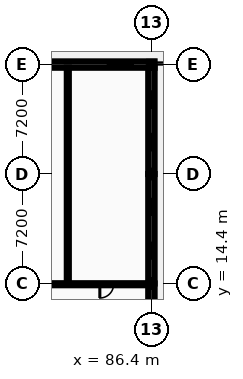
"""IFC4 building model, lengths in metres.
Left out: names, types, materials, properties, quantities, classifications, styles, units other than length and angle.
Written with IfcOpenShell. Run it as: python <this file> out.ifc"""

import sys

from ifc_helpers import new_model, si_unit, direction, frame, frame_2d, origin, origin_2d, place, context, subcontext, project, spatial, rectangle, i_section, extrude, element, fill, save


model = new_model("IFC4")
c1 = context("Model", 3, precision=1e-05, world=origin(), true_north=direction((0.0, 1.0)))
c2 = subcontext(c1, "Body", "Model", "MODEL_VIEW")
j1 = project(units=[si_unit("LENGTHUNIT", "METRE"), si_unit("PLANEANGLEUNIT", "RADIAN")], contexts=[c1])
p1 = place(None, origin())
s1 = spatial("IfcSite", under=j1, at=p1, CompositionType="ELEMENT")
p2 = place(p1, origin())
s2 = spatial("IfcBuilding", under=s1, at=p2, CompositionType="ELEMENT")
p3 = place(p2, origin())
s3 = spatial("IfcBuildingStorey", under=s2, at=p3, CompositionType="ELEMENT", Elevation=0.0)
for number, where, z_axis, x_axis in (
    (1, (86.4, 14.4, 0.0), (0.0, 0.0, 1.0), (1.0, 0.0, 0.0)),
    (2, (86.4, 21.6, 0.0), (0.0, 0.0, 1.0), (1.0, 0.0, 0.0)),
):
    element("IfcColumn", number, at=place(p3, frame(where, z_axis=z_axis, x_axis=x_axis)), inside=s3, PredefinedType="COLUMN", context=c2, shape_type="SweptSolid", body=[
        extrude(i_section(OverallWidth=0.3, OverallDepth=0.45, WebThickness=0.014, FlangeThickness=0.026, FilletRadius=0.027, at=origin_2d()), origin(), (0.0, 0.0, 1.0), 5.2),
    ])
p4 = place(p3, frame((86.4, 28.8, 0.0), z_axis=(0.0, 0.0, 1.0), x_axis=(1.0, 0.0, 0.0)))
e3 = element("IfcColumn", 3, at=p4, inside=s3, PredefinedType="COLUMN", context=c2, shape_type="SweptSolid", body=[
    extrude(i_section(OverallWidth=0.3, OverallDepth=0.36, WebThickness=0.012, FlangeThickness=0.022, FilletRadius=0.027, at=origin_2d()), origin(), (0.0, 0.0, 1.0), 5.2),
])
p5 = place(p3, frame((86.61, 28.8, 0.0), z_axis=(0.0, 0.0, 1.0), x_axis=(-1.0, 0.0, 0.0)))
e4 = element("IfcWall", 4, at=p5, inside=s3, PredefinedType="STANDARD", context=c2, shape_type="SweptSolid", body=[
    extrude(rectangle(XDim=7.52, YDim=0.42, at=frame_2d((3.76, 0.0))), origin(), (0.0, 0.0, 1.0), 4.665),
])
p6 = place(p5, frame((1.456, 0.0, 1.2)))
e5 = element("IfcOpeningElement", 5, at=p6, cuts=e4, PredefinedType="OPENING", context=c2, shape_type="SweptSolid", body=[
    extrude(rectangle(XDim=1.6, YDim=1.4, at=frame_2d((0.8, 0.7))), frame((0.0, 0.22, 0.0), z_axis=(0.0, -1.0, 0.0), x_axis=(1.0, 0.0, 0.0)), (0.0, 0.0, 1.0), 0.44),
])
p7 = place(p3, frame((86.4, 8.9, 0.0), z_axis=(0.0, 0.0, 1.0), x_axis=(0.0, 1.0, 0.0)))
e6 = element("IfcWall", 6, at=p7, inside=s3, PredefinedType="STANDARD", context=c2, shape_type="SweptSolid", body=[
    extrude(rectangle(XDim=5.5, YDim=0.42, at=frame_2d((2.75, 0.0))), origin(), (0.0, 0.0, 1.0), 4.97),
])
p8 = place(p3, frame((86.4, 14.4, 0.0), z_axis=(0.0, 0.0, 1.0), x_axis=(0.0, 1.0, 0.0)))
e7 = element("IfcWall", 7, at=p8, inside=s3, PredefinedType="STANDARD", context=c2, shape_type="SweptSolid", body=[
    extrude(rectangle(XDim=7.2, YDim=0.42, at=frame_2d((3.6, 0.0))), origin(), (0.0, 0.0, 1.0), 4.595),
])
p9 = place(p8, frame((1.662, 0.0, 0.95)))
e8 = element("IfcOpeningElement", 8, at=p9, cuts=e7, PredefinedType="OPENING", context=c2, shape_type="SweptSolid", body=[
    extrude(rectangle(XDim=0.996, YDim=1.26, at=frame_2d((0.498, 0.63))), frame((0.0, 0.22, 0.0), z_axis=(0.0, -1.0, 0.0), x_axis=(1.0, 0.0, 0.0)), (0.0, 0.0, 1.0), 0.44),
])
p10 = place(p8, frame((4.542, 0.0, 0.95)))
e9 = element("IfcOpeningElement", 9, at=p10, cuts=e7, PredefinedType="OPENING", context=c2, shape_type="SweptSolid", body=[
    extrude(rectangle(XDim=0.996, YDim=1.26, at=frame_2d((0.498, 0.63))), frame((0.0, 0.22, 0.0), z_axis=(0.0, -1.0, 0.0), x_axis=(1.0, 0.0, 0.0)), (0.0, 0.0, 1.0), 0.44),
])
p11 = place(p3, frame((86.4, 21.6, 0.0), z_axis=(0.0, 0.0, 1.0), x_axis=(0.0, 1.0, 0.0)))
e10 = element("IfcWall", 10, at=p11, inside=s3, PredefinedType="STANDARD", context=c2, shape_type="SweptSolid", body=[
    extrude(rectangle(XDim=6.99, YDim=0.42, at=frame_2d((3.495, 0.0))), origin(), (0.0, 0.0, 1.0), 4.595),
])
p12 = place(p11, frame((1.582, 0.0, 0.95)))
e11 = element("IfcOpeningElement", 11, at=p12, cuts=e10, PredefinedType="OPENING", context=c2, shape_type="SweptSolid", body=[
    extrude(rectangle(XDim=1.03, YDim=1.26, at=frame_2d((0.515, 0.63))), frame((0.0, 0.22, 0.0), z_axis=(0.0, -1.0, 0.0), x_axis=(1.0, 0.0, 0.0)), (0.0, 0.0, 1.0), 0.44),
])
p13 = place(p11, frame((4.378, 0.0, 0.95)))
e12 = element("IfcOpeningElement", 12, at=p13, cuts=e10, PredefinedType="OPENING", context=c2, shape_type="SweptSolid", body=[
    extrude(rectangle(XDim=1.03, YDim=1.26, at=frame_2d((0.515, 0.63))), frame((0.0, 0.22, 0.0), z_axis=(0.0, -1.0, 0.0), x_axis=(1.0, 0.0, 0.0)), (0.0, 0.0, 1.0), 0.44),
])
p14 = place(p3, frame((79.58, 14.35, 0.0), z_axis=(0.0, 0.0, 1.0), x_axis=(1.0, 0.0, 0.0)))
e13 = element("IfcWall", 13, at=p14, inside=s3, PredefinedType="PARTITIONING", context=c2, shape_type="SweptSolid", body=[
    extrude(rectangle(XDim=6.44, YDim=0.135, at=frame_2d((3.22, 0.0))), origin(), (0.0, 0.0, 1.0), 4.665),
])
p15 = place(p14, frame((3.427, 0.0, 0.0)))
e14 = element("IfcOpeningElement", 14, at=p15, cuts=e13, PredefinedType="OPENING", context=c2, shape_type="SweptSolid", body=[
    extrude(rectangle(XDim=0.906, YDim=2.096, at=frame_2d((0.453, 1.048))), frame((0.0, 0.078, 0.0), z_axis=(0.0, -1.0, 0.0), x_axis=(1.0, 0.0, 0.0)), (0.0, 0.0, 1.0), 0.155),
])
p16 = place(p3, frame((80.9, 14.417, 0.0), z_axis=(0.0, 0.0, 1.0), x_axis=(0.0, 1.0, 0.0)))
e15 = element("IfcWall", 15, at=p16, inside=s3, PredefinedType="PARTITIONING", context=c2, shape_type="SweptSolid", body=[
    extrude(rectangle(XDim=14.183, YDim=0.135, at=frame_2d((7.091, 0.0))), origin(), (0.0, 0.0, 1.0), 4.97),
])
p17 = place(p6, origin())
e16 = element("IfcWindow", 16, at=p17, inside=s3, PartitioningType="SINGLE_PANEL", PredefinedType="WINDOW", context=c2, shape_type="SweptSolid", body=[
    extrude(rectangle(XDim=1.6, YDim=1.4, at=frame_2d((0.8, 0.7))), frame((0.0, 0.03, 0.0), z_axis=(0.0, -1.0, 0.0), x_axis=(1.0, 0.0, 0.0)), (0.0, 0.0, 1.0), 0.06),
])
fill(e5, e16)
p18 = place(p9, origin())
e17 = element("IfcWindow", 17, at=p18, inside=s3, PartitioningType="SINGLE_PANEL", PredefinedType="WINDOW", context=c2, shape_type="SweptSolid", body=[
    extrude(rectangle(XDim=0.996, YDim=1.26, at=frame_2d((0.498, 0.63))), frame((0.0, 0.03, 0.0), z_axis=(0.0, -1.0, 0.0), x_axis=(1.0, 0.0, 0.0)), (0.0, 0.0, 1.0), 0.06),
])
fill(e8, e17)
p19 = place(p10, origin())
e18 = element("IfcWindow", 18, at=p19, inside=s3, PartitioningType="SINGLE_PANEL", PredefinedType="WINDOW", context=c2, shape_type="SweptSolid", body=[
    extrude(rectangle(XDim=0.996, YDim=1.26, at=frame_2d((0.498, 0.63))), frame((0.0, 0.03, 0.0), z_axis=(0.0, -1.0, 0.0), x_axis=(1.0, 0.0, 0.0)), (0.0, 0.0, 1.0), 0.06),
])
fill(e9, e18)
p20 = place(p12, origin())
e19 = element("IfcWindow", 19, at=p20, inside=s3, PartitioningType="SINGLE_PANEL", PredefinedType="WINDOW", context=c2, shape_type="SweptSolid", body=[
    extrude(rectangle(XDim=1.03, YDim=1.26, at=frame_2d((0.515, 0.63))), frame((0.0, 0.03, 0.0), z_axis=(0.0, -1.0, 0.0), x_axis=(1.0, 0.0, 0.0)), (0.0, 0.0, 1.0), 0.06),
])
fill(e11, e19)
p21 = place(p13, origin())
e20 = element("IfcWindow", 20, at=p21, inside=s3, PartitioningType="SINGLE_PANEL", PredefinedType="WINDOW", context=c2, shape_type="SweptSolid", body=[
    extrude(rectangle(XDim=1.03, YDim=1.26, at=frame_2d((0.515, 0.63))), frame((0.0, 0.03, 0.0), z_axis=(0.0, -1.0, 0.0), x_axis=(1.0, 0.0, 0.0)), (0.0, 0.0, 1.0), 0.06),
])
fill(e12, e20)
p22 = place(p15, frame((0.906, 0.0, 0.0), z_axis=(0.0, 0.0, 1.0), x_axis=(-1.0, 0.0, 0.0)))
e21 = element("IfcDoor", 21, at=p22, inside=s3, OperationType="SINGLE_SWING_LEFT", PredefinedType="DOOR", context=c2, shape_type="SweptSolid", body=[
    extrude(rectangle(XDim=0.906, YDim=2.096, at=frame_2d((0.453, 1.048))), frame((0.0, 0.025, 0.0), z_axis=(0.0, -1.0, 0.0), x_axis=(1.0, 0.0, 0.0)), (0.0, 0.0, 1.0), 0.05),
])
fill(e14, e21)
save(model, sys.argv[1])
